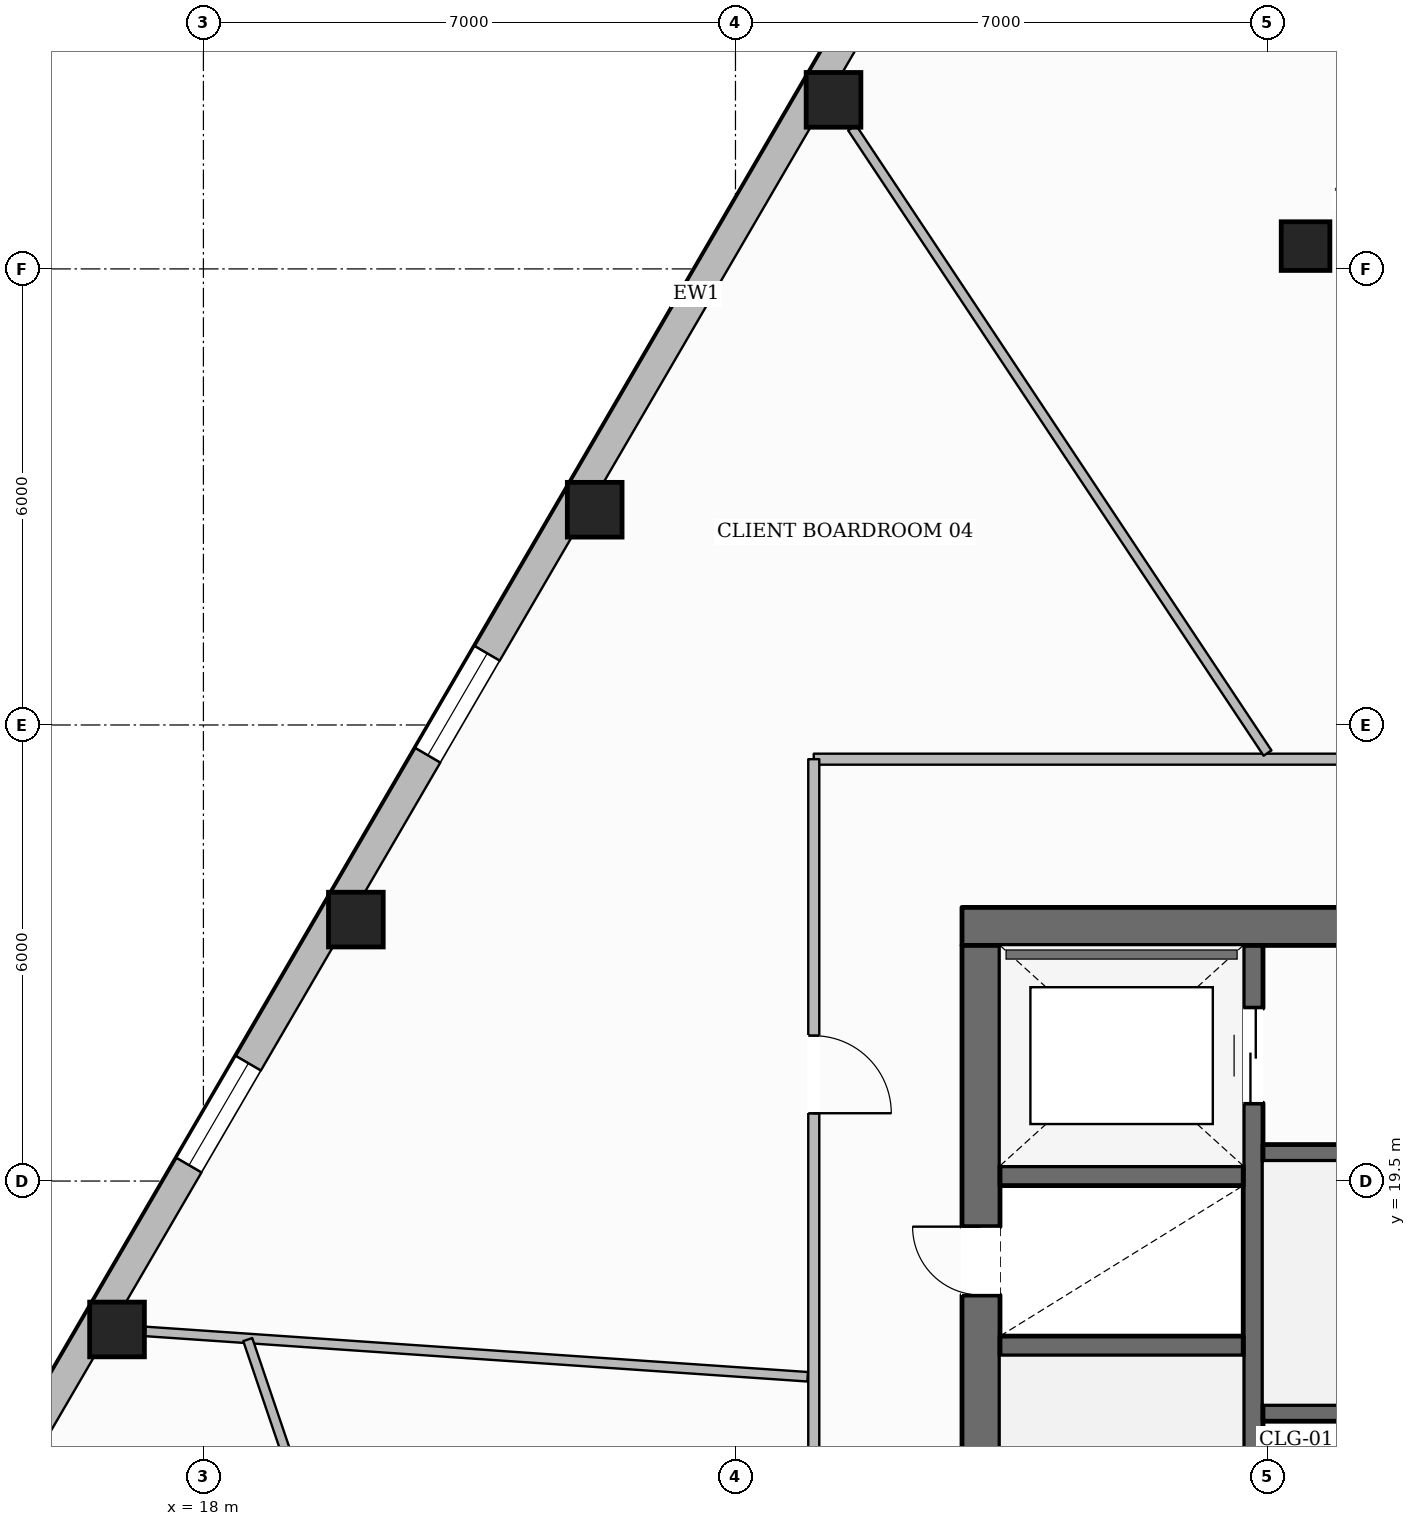
"""IFC4 building model, lengths in metres.
Left out: names, types, materials, properties, quantities, classifications, styles, units other than length and angle.
Written with IfcOpenShell. Run it as: python <this file> out.ifc"""

import sys

from ifc_helpers import new_model, si_unit, direction, frame, frame_2d, origin, origin_2d, place, context, subcontext, project, spatial, rectangle, hollow_rectangle, extrude, element, fill, save


model = new_model("IFC4")
c1 = context("Model", 3, precision=1e-05, world=origin(), true_north=direction((0.0, 1.0)))
c2 = subcontext(c1, "Body", "Model", "MODEL_VIEW")
j1 = project(units=[si_unit("LENGTHUNIT", "METRE"), si_unit("PLANEANGLEUNIT", "RADIAN")], contexts=[c1])
p1 = place(None, origin())
s1 = spatial("IfcSite", under=j1, at=p1, CompositionType="ELEMENT")
p2 = place(p1, origin())
s2 = spatial("IfcBuilding", under=s1, at=p2, CompositionType="ELEMENT")
p3 = place(p2, frame((0.0, 0.0, 147.1)))
s3 = spatial("IfcBuildingStorey", under=s2, at=p3, CompositionType="ELEMENT", Elevation=147.1)
p4 = place(p3, frame((27.98, 22.85, 0.0), z_axis=(0.0, 0.0, 1.0), x_axis=(1.0, 0.0, 0.0)))
e1 = element("IfcWall", 1, at=p4, inside=s3, PredefinedType="SOLIDWALL", context=c2, shape_type="SweptSolid", body=[
    extrude(rectangle(XDim=20.04, YDim=0.5, at=frame_2d((10.02, 0.0))), origin(), (0.0, 0.0, 1.0), 3.6),
])
p5 = place(p4, frame((6.295, 0.0, 0.0)))
e2 = element("IfcOpeningElement", 2, at=p5, cuts=e1, PredefinedType="OPENING", context=c2, shape_type="SweptSolid", body=[
    extrude(rectangle(XDim=1.05, YDim=2.15, at=frame_2d((0.525, 1.075))), frame((0.0, 0.26, 0.0), z_axis=(0.0, -1.0, 0.0), x_axis=(1.0, 0.0, 0.0)), (0.0, 0.0, 1.0), 0.52),
])
p6 = place(p4, frame((12.695, 0.0, 0.0)))
e3 = element("IfcOpeningElement", 3, at=p6, cuts=e1, PredefinedType="OPENING", context=c2, shape_type="SweptSolid", body=[
    extrude(rectangle(XDim=1.05, YDim=2.15, at=frame_2d((0.525, 1.075))), frame((0.0, 0.26, 0.0), z_axis=(0.0, -1.0, 0.0), x_axis=(1.0, 0.0, 0.0)), (0.0, 0.0, 1.0), 0.52),
])
p7 = place(p3, frame((28.23, 9.6, 0.0), z_axis=(0.0, 0.0, 1.0), x_axis=(0.0, 1.0, 0.0)))
e4 = element("IfcWall", 4, at=p7, inside=s3, PredefinedType="SOLIDWALL", context=c2, shape_type="SweptSolid", body=[
    extrude(rectangle(XDim=13.0, YDim=0.5, at=frame_2d((6.5, 0.0))), origin(), (0.0, 0.0, 1.0), 3.6),
])
p8 = place(p7, frame((0.2, 0.0, 0.0)))
e5 = element("IfcOpeningElement", 5, at=p8, cuts=e4, PredefinedType="OPENING", context=c2, shape_type="SweptSolid", body=[
    extrude(rectangle(XDim=1.1, YDim=2.15, at=frame_2d((0.55, 1.075))), frame((0.0, 0.26, 0.0), z_axis=(0.0, -1.0, 0.0), x_axis=(1.0, 0.0, 0.0)), (0.0, 0.0, 1.0), 0.52),
])
p9 = place(p7, frame((8.4, 0.0, 0.0)))
e6 = element("IfcOpeningElement", 6, at=p9, cuts=e4, PredefinedType="OPENING", context=c2, shape_type="SweptSolid", body=[
    extrude(rectangle(XDim=0.9, YDim=2.1, at=frame_2d((0.45, 1.05))), frame((0.0, 0.26, 0.0), z_axis=(0.0, -1.0, 0.0), x_axis=(1.0, 0.0, 0.0)), (0.0, 0.0, 1.0), 0.52),
])
p10 = place(p3, frame((31.81, 9.6, 0.0), z_axis=(0.0, 0.0, 1.0), x_axis=(0.0, 1.0, 0.0)))
e7 = element("IfcWall", 7, at=p10, inside=s3, PredefinedType="SHEAR", context=c2, shape_type="SweptSolid", body=[
    extrude(rectangle(XDim=13.0, YDim=0.26, at=frame_2d((6.5, 0.0))), origin(), (0.0, 0.0, 1.0), 3.6),
])
p11 = place(p10, frame((10.925, 0.0, 0.0)))
e8 = element("IfcOpeningElement", 8, at=p11, cuts=e7, PredefinedType="OPENING", context=c2, shape_type="SweptSolid", body=[
    extrude(rectangle(XDim=1.25, YDim=2.25, at=frame_2d((0.625, 1.125))), frame((0.0, 0.14, 0.0), z_axis=(0.0, -1.0, 0.0), x_axis=(1.0, 0.0, 0.0)), (0.0, 0.0, 1.0), 0.28),
])
for number, where, z_axis, x_axis in (
    (9, (28.48, 17.33, 0.0), (0.0, 0.0, 1.0), (1.0, 0.0, 0.0)),
    (10, (28.48, 19.57, 0.0), (0.0, 0.0, 1.0), (1.0, 0.0, 0.0)),
):
    element("IfcWall", number, at=place(p3, frame(where, z_axis=z_axis, x_axis=x_axis)), inside=s3, PredefinedType="SHEAR", context=c2, shape_type="SweptSolid", body=[
        extrude(rectangle(XDim=3.2, YDim=0.26, at=frame_2d((1.6, 0.0))), origin(), (0.0, 0.0, 1.0), 3.6),
    ])
p12 = place(p3, frame((31.94, 19.87, 0.0), z_axis=(0.0, 0.0, 1.0), x_axis=(1.0, 0.0, 0.0)))
e11 = element("IfcWall", 11, at=p12, inside=s3, PredefinedType="SOLIDWALL", context=c2, shape_type="SweptSolid", body=[
    extrude(rectangle(XDim=12.12, YDim=0.22, at=frame_2d((6.06, 0.0))), origin(), (0.0, 0.0, 1.0), 3.6),
])
p13 = place(p12, frame((6.3, 0.0, 0.0)))
e12 = element("IfcOpeningElement", 12, at=p13, cuts=e11, PredefinedType="OPENING", context=c2, shape_type="SweptSolid", body=[
    extrude(rectangle(XDim=1.1, YDim=2.15, at=frame_2d((0.55, 1.075))), frame((0.0, 0.12, 0.0), z_axis=(0.0, -1.0, 0.0), x_axis=(1.0, 0.0, 0.0)), (0.0, 0.0, 1.0), 0.24),
])
p14 = place(p12, frame((9.51, 0.0, 0.0)))
e13 = element("IfcOpeningElement", 13, at=p14, cuts=e11, PredefinedType="OPENING", context=c2, shape_type="SweptSolid", body=[
    extrude(rectangle(XDim=0.9, YDim=2.1, at=frame_2d((0.45, 1.05))), frame((0.0, 0.12, 0.0), z_axis=(0.0, -1.0, 0.0), x_axis=(1.0, 0.0, 0.0)), (0.0, 0.0, 1.0), 0.24),
])
p15 = place(p3, frame((31.94, 16.45, 0.0), z_axis=(0.0, 0.0, 1.0), x_axis=(1.0, 0.0, 0.0)))
e14 = element("IfcWall", 14, at=p15, inside=s3, PredefinedType="SOLIDWALL", context=c2, shape_type="SweptSolid", body=[
    extrude(rectangle(XDim=12.12, YDim=0.22, at=frame_2d((6.06, 0.0))), origin(), (0.0, 0.0, 1.0), 3.6),
])
for number, where, z_axis, x_axis in (
    (15, (26.29, 33.724, 0.0), (0.0, 0.0, 1.0), (1.0, 0.0, 0.0)),
    (16, (23.148, 28.332, 0.0), (0.0, 0.0, 1.0), (1.0, 0.0, 0.0)),
    (17, (20.006, 22.94, 0.0), (0.0, 0.0, 1.0), (1.0, 0.0, 0.0)),
    (18, (16.864, 17.547, 0.0), (0.0, 0.0, 1.0), (1.0, 0.0, 0.0)),
):
    element("IfcColumn", number, at=place(p3, frame(where, z_axis=z_axis, x_axis=x_axis)), inside=s3, PredefinedType="COLUMN", context=c2, shape_type="SweptSolid", body=[
        extrude(hollow_rectangle(XDim=0.72, YDim=0.72, WallThickness=0.032, at=origin_2d()), origin(), (0.0, 0.0, 1.0), 3.6),
    ])
p16 = place(p3, frame((32.5, 31.8, 0.0), z_axis=(0.0, 0.0, 1.0), x_axis=(1.0, 0.0, 0.0)))
e19 = element("IfcColumn", 19, at=p16, inside=s3, PredefinedType="COLUMN", context=c2, shape_type="SweptSolid", body=[
    extrude(hollow_rectangle(XDim=0.64, YDim=0.64, WallThickness=0.028, at=origin_2d()), origin(), (0.0, 0.0, 1.0), 3.6),
])
p17 = place(p3, frame((13.248, 11.879, 0.0), z_axis=(0.0, 0.0, 1.0), x_axis=(0.503467320033, 0.864014269361, 0.0)))
e20 = element("IfcWall", 20, at=p17, inside=s3, PredefinedType="STANDARD", context=c2, shape_type="SweptSolid", body=[
    extrude(rectangle(XDim=38.396, YDim=0.38, at=frame_2d((19.198, 0.0))), origin(), (0.0, 0.0, 1.0), 3.059),
])
p18 = place(p17, frame((34.027, 0.0, 0.65)))
e21 = element("IfcOpeningElement", 21, at=p18, cuts=e20, PredefinedType="OPENING", context=c2, shape_type="SweptSolid", body=[
    extrude(rectangle(XDim=1.55, YDim=1.75, at=frame_2d((0.775, 0.875))), frame((0.0, 0.2, 0.0), z_axis=(0.0, -1.0, 0.0), x_axis=(1.0, 0.0, 0.0)), (0.0, 0.0, 1.0), 0.4),
])
p19 = place(p17, frame((27.786, 0.0, 0.65)))
e22 = element("IfcOpeningElement", 22, at=p19, cuts=e20, PredefinedType="OPENING", context=c2, shape_type="SweptSolid", body=[
    extrude(rectangle(XDim=1.55, YDim=1.75, at=frame_2d((0.775, 0.875))), frame((0.0, 0.2, 0.0), z_axis=(0.0, -1.0, 0.0), x_axis=(1.0, 0.0, 0.0)), (0.0, 0.0, 1.0), 0.4),
])
p20 = place(p17, frame((15.304, 0.0, 0.65)))
e23 = element("IfcOpeningElement", 23, at=p20, cuts=e20, PredefinedType="OPENING", context=c2, shape_type="SweptSolid", body=[
    extrude(rectangle(XDim=1.55, YDim=1.75, at=frame_2d((0.775, 0.875))), frame((0.0, 0.2, 0.0), z_axis=(0.0, -1.0, 0.0), x_axis=(1.0, 0.0, 0.0)), (0.0, 0.0, 1.0), 0.4),
])
p21 = place(p17, frame((9.063, 0.0, 0.65)))
e24 = element("IfcOpeningElement", 24, at=p21, cuts=e20, PredefinedType="OPENING", context=c2, shape_type="SweptSolid", body=[
    extrude(rectangle(XDim=1.55, YDim=1.75, at=frame_2d((0.775, 0.875))), frame((0.0, 0.2, 0.0), z_axis=(0.0, -1.0, 0.0), x_axis=(1.0, 0.0, 0.0)), (0.0, 0.0, 1.0), 0.4),
])
p22 = place(p17, frame((2.823, 0.0, 0.65)))
e25 = element("IfcOpeningElement", 25, at=p22, cuts=e20, PredefinedType="OPENING", context=c2, shape_type="SweptSolid", body=[
    extrude(rectangle(XDim=1.55, YDim=1.75, at=frame_2d((0.775, 0.875))), frame((0.0, 0.2, 0.0), z_axis=(0.0, -1.0, 0.0), x_axis=(1.0, 0.0, 0.0)), (0.0, 0.0, 1.0), 0.4),
])
p23 = place(p3, frame((49.97, 25.05, 0.0), z_axis=(0.0, 0.0, 1.0), x_axis=(-1.0, 0.0, 0.0)))
e26 = element("IfcWall", 26, at=p23, inside=s3, PredefinedType="PARTITIONING", context=c2, shape_type="SweptSolid", body=[
    extrude(rectangle(XDim=23.94, YDim=0.145, at=frame_2d((11.97, 0.0))), origin(), (0.0, 0.0, 1.0), 3.6),
])
p24 = place(p23, frame((3.738, 0.0, 0.0)))
e27 = element("IfcOpeningElement", 27, at=p24, cuts=e26, PredefinedType="OPENING", context=c2, shape_type="SweptSolid", body=[
    extrude(rectangle(XDim=1.02, YDim=2.15, at=frame_2d((0.51, 1.075))), frame((0.0, 0.083, 0.0), z_axis=(0.0, -1.0, 0.0), x_axis=(1.0, 0.0, 0.0)), (0.0, 0.0, 1.0), 0.165),
])
p25 = place(p23, frame((12.624, 0.0, 0.0)))
e28 = element("IfcOpeningElement", 28, at=p25, cuts=e26, PredefinedType="OPENING", context=c2, shape_type="SweptSolid", body=[
    extrude(rectangle(XDim=1.4, YDim=2.2, at=frame_2d((0.7, 1.1))), frame((0.0, 0.083, 0.0), z_axis=(0.0, -1.0, 0.0), x_axis=(1.0, 0.0, 0.0)), (0.0, 0.0, 1.0), 0.165),
])
p26 = place(p3, frame((26.03, 25.05, 0.0), z_axis=(0.0, 0.0, 1.0), x_axis=(0.0, -1.0, 0.0)))
e29 = element("IfcWall", 29, at=p26, inside=s3, PredefinedType="PARTITIONING", context=c2, shape_type="SweptSolid", body=[
    extrude(rectangle(XDim=17.9, YDim=0.145, at=frame_2d((8.95, 0.0))), origin(), (0.0, 0.0, 1.0), 3.288),
])
p27 = place(p26, frame((3.638, 0.0, 0.0)))
e30 = element("IfcOpeningElement", 30, at=p27, cuts=e29, PredefinedType="OPENING", context=c2, shape_type="SweptSolid", body=[
    extrude(rectangle(XDim=1.02, YDim=2.15, at=frame_2d((0.51, 1.075))), frame((0.0, 0.083, 0.0), z_axis=(0.0, -1.0, 0.0), x_axis=(1.0, 0.0, 0.0)), (0.0, 0.0, 1.0), 0.165),
])
p28 = place(p26, frame((12.417, 0.0, 0.0)))
e31 = element("IfcOpeningElement", 31, at=p28, cuts=e29, PredefinedType="OPENING", context=c2, shape_type="SweptSolid", body=[
    extrude(rectangle(XDim=1.02, YDim=2.15, at=frame_2d((0.51, 1.075))), frame((0.0, 0.083, 0.0), z_axis=(0.0, -1.0, 0.0), x_axis=(1.0, 0.0, 0.0)), (0.0, 0.0, 1.0), 0.165),
])
p29 = place(p3, frame((32.0, 25.131, 0.0), z_axis=(0.0, 0.0, 1.0), x_axis=(-0.553410221261, 0.83290883475, 0.0)))
e32 = element("IfcWall", 32, at=p29, inside=s3, PredefinedType="PARTITIONING", context=c2, shape_type="SweptSolid", body=[
    extrude(rectangle(XDim=9.876, YDim=0.125, at=frame_2d((4.938, 0.0))), origin(), (0.0, 0.0, 1.0), 3.6),
])
p30 = place(p3, frame((25.949, 16.925, 0.0), z_axis=(0.0, 0.0, 1.0), x_axis=(-0.997662095491, 0.06833990942, 0.0)))
e33 = element("IfcWall", 33, at=p30, inside=s3, PredefinedType="PARTITIONING", context=c2, shape_type="SweptSolid", body=[
    extrude(rectangle(XDim=8.738, YDim=0.125, at=frame_2d((4.369, 0.0))), origin(), (0.0, 0.0, 1.0), 3.141),
])
p31 = place(p3, frame((18.583, 17.415, 0.0), z_axis=(0.0, 0.0, 1.0), x_axis=(0.321056186339, -0.947060148678, 0.0)))
e34 = element("IfcWall", 34, at=p31, inside=s3, PredefinedType="PARTITIONING", context=c2, shape_type="SweptSolid", body=[
    extrude(rectangle(XDim=15.368, YDim=0.125, at=frame_2d((7.684, 0.0))), origin(), (0.0, 0.0, 1.0), 3.6),
])
p32 = place(p31, frame((7.287, 0.0, 0.0)))
e35 = element("IfcOpeningElement", 35, at=p32, cuts=e34, PredefinedType="OPENING", context=c2, shape_type="SweptSolid", body=[
    extrude(rectangle(XDim=1.02, YDim=2.15, at=frame_2d((0.51, 1.075))), frame((0.0, 0.073, 0.0), z_axis=(0.0, -1.0, 0.0), x_axis=(1.0, 0.0, 0.0)), (0.0, 0.0, 1.0), 0.145),
])
p33 = place(p20, origin())
e36 = element("IfcWindow", 36, at=p33, inside=s3, PartitioningType="SINGLE_PANEL", PredefinedType="WINDOW", context=c2, shape_type="SweptSolid", body=[
    extrude(rectangle(XDim=1.55, YDim=1.75, at=frame_2d((0.775, 0.875))), frame((0.0, 0.03, 0.0), z_axis=(0.0, -1.0, 0.0), x_axis=(1.0, 0.0, 0.0)), (0.0, 0.0, 1.0), 0.06),
])
fill(e23, e36)
p34 = place(p21, origin())
e37 = element("IfcWindow", 37, at=p34, inside=s3, PartitioningType="SINGLE_PANEL", PredefinedType="WINDOW", context=c2, shape_type="SweptSolid", body=[
    extrude(rectangle(XDim=1.55, YDim=1.75, at=frame_2d((0.775, 0.875))), frame((0.0, 0.03, 0.0), z_axis=(0.0, -1.0, 0.0), x_axis=(1.0, 0.0, 0.0)), (0.0, 0.0, 1.0), 0.06),
])
fill(e24, e37)
p35 = place(p9, origin())
e38 = element("IfcDoor", 38, at=p35, inside=s3, OperationType="SINGLE_SWING_RIGHT", PredefinedType="DOOR", context=c2, shape_type="SweptSolid", body=[
    extrude(rectangle(XDim=0.9, YDim=2.1, at=frame_2d((0.45, 1.05))), frame((0.0, 0.025, 0.0), z_axis=(0.0, -1.0, 0.0), x_axis=(1.0, 0.0, 0.0)), (0.0, 0.0, 1.0), 0.05),
])
fill(e6, e38)
p36 = place(p11, origin())
e39 = element("IfcDoor", 39, at=p36, inside=s3, OperationType="DOUBLE_DOOR_SLIDING", PredefinedType="DOOR", context=c2, shape_type="SweptSolid", body=[
    extrude(rectangle(XDim=1.25, YDim=2.25, at=frame_2d((0.625, 1.125))), frame((0.0, 0.025, 0.0), z_axis=(0.0, -1.0, 0.0), x_axis=(1.0, 0.0, 0.0)), (0.0, 0.0, 1.0), 0.05),
])
fill(e8, e39)
p37 = place(p27, origin())
e40 = element("IfcDoor", 40, at=p37, inside=s3, OperationType="SINGLE_SWING_RIGHT", PredefinedType="DOOR", context=c2, shape_type="SweptSolid", body=[
    extrude(rectangle(XDim=1.02, YDim=2.15, at=frame_2d((0.51, 1.075))), frame((0.0, 0.025, 0.0), z_axis=(0.0, -1.0, 0.0), x_axis=(1.0, 0.0, 0.0)), (0.0, 0.0, 1.0), 0.05),
])
fill(e30, e40)
save(model, sys.argv[1])
